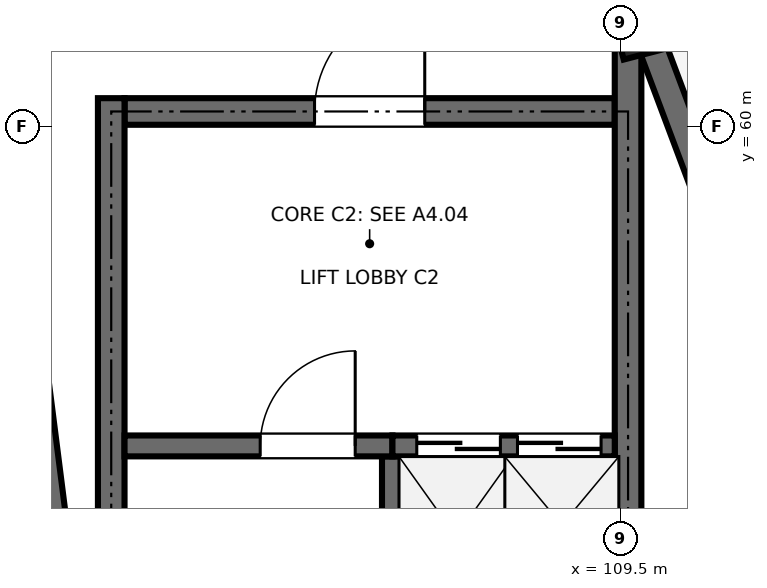
"""IFC4 building model, lengths in metres.
Left out: names, types, materials, properties, quantities, classifications, styles, units other than length and angle.
Written with IfcOpenShell. Run it as: python <this file> out.ifc"""

import sys

from ifc_helpers import new_model, si_unit, direction, frame, frame_2d, origin, origin_2d, place, context, subcontext, project, spatial, rectangle, extrude, element, fill, save


model = new_model("IFC4")
c1 = context("Model", 3, precision=1e-05, world=origin(), true_north=direction((0.0, 1.0)))
c2 = subcontext(c1, "Body", "Model", "MODEL_VIEW")
j1 = project(units=[si_unit("LENGTHUNIT", "METRE"), si_unit("PLANEANGLEUNIT", "RADIAN")], contexts=[c1])
p1 = place(None, origin())
s1 = spatial("IfcSite", under=j1, at=p1, CompositionType="ELEMENT")
p2 = place(p1, origin())
s2 = spatial("IfcBuilding", under=s1, at=p2, CompositionType="ELEMENT")
p3 = place(p2, frame((0.0, 0.0, 14.4)))
s3 = spatial("IfcBuildingStorey", under=s2, at=p3, CompositionType="ELEMENT", Elevation=14.4)
p4 = place(p3, frame((109.811, 61.34, 0.0), z_axis=(0.0, 0.0, 1.0), x_axis=(0.967841021032, 0.251562632376, 0.0)))
e1 = element("IfcColumn", 1, at=p4, inside=s3, PredefinedType="COLUMN", context=c2, shape_type="SweptSolid", body=[
    extrude(rectangle(XDim=0.75, YDim=0.75, at=origin_2d()), origin(), (0.0, 0.0, 1.0), 4.2),
])
p5 = place(p3, frame((111.075, 57.973, 0.0), z_axis=(0.0, 0.0, 1.0), x_axis=(-0.351279653979, 0.936270583058, 0.0)))
e2 = element("IfcWall", 2, at=p5, inside=s3, PredefinedType="SHEAR", context=c2, shape_type="SweptSolid", body=[
    extrude(rectangle(XDim=3.597, YDim=0.36, at=frame_2d((1.798, 0.0))), origin(), (0.0, 0.0, 1.0), 3.96),
])
p6 = place(p3, frame((102.1, 54.5, 0.0), z_axis=(0.0, 0.0, 1.0), x_axis=(-0.126180195213, 0.992007337844, 0.0)))
e3 = element("IfcWall", 3, at=p6, inside=s3, PredefinedType="SHEAR", context=c2, shape_type="SweptSolid", body=[
    extrude(rectangle(XDim=2.24, YDim=0.3, at=frame_2d((1.12, 0.0))), origin(), (0.0, 0.0, 1.0), 3.96),
])
p7 = place(p3, frame((102.975, 60.2, 0.0), z_axis=(0.0, 0.0, 1.0), x_axis=(1.0, 0.0, 0.0)))
e4 = element("IfcWall", 4, at=p7, inside=s3, PredefinedType="SHEAR", context=c2, shape_type="SweptSolid", body=[
    extrude(rectangle(XDim=6.45, YDim=0.35, at=frame_2d((3.225, 0.0))), origin(), (0.0, 0.0, 1.0), 3.96),
])
p8 = place(p7, frame((2.5, 0.0, 0.0)))
e5 = element("IfcOpeningElement", 5, at=p8, cuts=e4, PredefinedType="OPENING", context=c2, shape_type="SweptSolid", body=[
    extrude(rectangle(XDim=1.45, YDim=2.2, at=frame_2d((0.725, 1.1))), frame((0.0, 0.185, 0.0), z_axis=(0.0, -1.0, 0.0), x_axis=(1.0, 0.0, 0.0)), (0.0, 0.0, 1.0), 0.37),
])
p9 = place(p3, frame((102.8, 48.775, 0.0), z_axis=(0.0, 0.0, 1.0), x_axis=(0.0, 1.0, 0.0)))
e6 = element("IfcWall", 6, at=p9, inside=s3, PredefinedType="SHEAR", context=c2, shape_type="SweptSolid", body=[
    extrude(rectangle(XDim=11.6, YDim=0.35, at=frame_2d((5.8, 0.0))), origin(), (0.0, 0.0, 1.0), 3.96),
])
p10 = place(p3, frame((109.6, 48.775, 0.0), z_axis=(0.0, 0.0, 1.0), x_axis=(0.0, 1.0, 0.0)))
e7 = element("IfcWall", 7, at=p10, inside=s3, PredefinedType="SHEAR", context=c2, shape_type="SweptSolid", body=[
    extrude(rectangle(XDim=12.565, YDim=0.35, at=frame_2d((6.283, 0.0))), origin(), (0.0, 0.0, 1.0), 3.96),
])
p11 = place(p3, frame((106.5, 48.775, 0.0), z_axis=(0.0, 0.0, 1.0), x_axis=(0.0, 1.0, 0.0)))
e8 = element("IfcWall", 8, at=p11, inside=s3, PredefinedType="SHEAR", context=c2, shape_type="SweptSolid", body=[
    extrude(rectangle(XDim=6.888, YDim=0.275, at=frame_2d((3.444, 0.0))), origin(), (0.0, 0.0, 1.0), 3.96),
])
p12 = place(p3, frame((102.975, 55.8, 0.0), z_axis=(0.0, 0.0, 1.0), x_axis=(1.0, 0.0, 0.0)))
e9 = element("IfcWall", 9, at=p12, inside=s3, PredefinedType="SHEAR", context=c2, shape_type="SweptSolid", body=[
    extrude(rectangle(XDim=3.525, YDim=0.275, at=frame_2d((1.762, 0.0))), origin(), (0.0, 0.0, 1.0), 3.96),
])
p13 = place(p12, frame((1.785, 0.0, 0.0)))
e10 = element("IfcOpeningElement", 10, at=p13, cuts=e9, PredefinedType="OPENING", context=c2, shape_type="SweptSolid", body=[
    extrude(rectangle(XDim=1.25, YDim=2.15, at=frame_2d((0.625, 1.075))), frame((0.0, 0.147, 0.0), z_axis=(0.0, -1.0, 0.0), x_axis=(1.0, 0.0, 0.0)), (0.0, 0.0, 1.0), 0.295),
])
p14 = place(p3, frame((106.5, 55.8, 0.0), z_axis=(0.0, 0.0, 1.0), x_axis=(1.0, 0.0, 0.0)))
e11 = element("IfcWall", 11, at=p14, inside=s3, PredefinedType="SHEAR", context=c2, shape_type="SweptSolid", body=[
    extrude(rectangle(XDim=2.925, YDim=0.275, at=frame_2d((1.462, 0.0))), origin(), (0.0, 0.0, 1.0), 3.96),
])
p15 = place(p14, frame((0.32, 0.0, 0.0)))
e12 = element("IfcOpeningElement", 12, at=p15, cuts=e11, PredefinedType="OPENING", context=c2, shape_type="SweptSolid", body=[
    extrude(rectangle(XDim=1.1, YDim=2.15, at=frame_2d((0.55, 1.075))), frame((0.0, 0.147, 0.0), z_axis=(0.0, -1.0, 0.0), x_axis=(1.0, 0.0, 0.0)), (0.0, 0.0, 1.0), 0.295),
])
p16 = place(p14, frame((1.645, 0.0, 0.0)))
e13 = element("IfcOpeningElement", 13, at=p16, cuts=e11, PredefinedType="OPENING", context=c2, shape_type="SweptSolid", body=[
    extrude(rectangle(XDim=1.1, YDim=2.15, at=frame_2d((0.55, 1.075))), frame((0.0, 0.147, 0.0), z_axis=(0.0, -1.0, 0.0), x_axis=(1.0, 0.0, 0.0)), (0.0, 0.0, 1.0), 0.295),
])
p17 = place(p3, frame((108.032, 48.775, 0.0), z_axis=(0.0, 0.0, 1.0), x_axis=(0.0, 1.0, 0.0)))
e14 = element("IfcWall", 14, at=p17, inside=s3, PredefinedType="PARTITIONING", context=c2, shape_type="SweptSolid", body=[
    extrude(rectangle(XDim=6.825, YDim=0.15, at=frame_2d((3.413, 0.0))), origin(), (0.0, 0.0, 1.0), 3.954),
])
p18 = place(p13, origin())
e15 = element("IfcDoor", 15, at=p18, inside=s3, OperationType="SINGLE_SWING_RIGHT", PredefinedType="DOOR", context=c2, shape_type="SweptSolid", body=[
    extrude(rectangle(XDim=1.25, YDim=2.15, at=frame_2d((0.625, 1.075))), frame((0.0, 0.025, 0.0), z_axis=(0.0, -1.0, 0.0), x_axis=(1.0, 0.0, 0.0)), (0.0, 0.0, 1.0), 0.05),
])
fill(e10, e15)
p19 = place(p15, origin())
e16 = element("IfcDoor", 16, at=p19, inside=s3, OperationType="DOUBLE_DOOR_SLIDING", PredefinedType="DOOR", context=c2, shape_type="SweptSolid", body=[
    extrude(rectangle(XDim=1.1, YDim=2.15, at=frame_2d((0.55, 1.075))), frame((0.0, 0.025, 0.0), z_axis=(0.0, -1.0, 0.0), x_axis=(1.0, 0.0, 0.0)), (0.0, 0.0, 1.0), 0.05),
])
fill(e12, e16)
p20 = place(p16, origin())
e17 = element("IfcDoor", 17, at=p20, inside=s3, OperationType="DOUBLE_DOOR_SLIDING", PredefinedType="DOOR", context=c2, shape_type="SweptSolid", body=[
    extrude(rectangle(XDim=1.1, YDim=2.15, at=frame_2d((0.55, 1.075))), frame((0.0, 0.025, 0.0), z_axis=(0.0, -1.0, 0.0), x_axis=(1.0, 0.0, 0.0)), (0.0, 0.0, 1.0), 0.05),
])
fill(e13, e17)
p21 = place(p8, origin())
e18 = element("IfcDoor", 18, at=p21, inside=s3, OperationType="SINGLE_SWING_RIGHT", PredefinedType="DOOR", context=c2, shape_type="SweptSolid", body=[
    extrude(rectangle(XDim=1.45, YDim=2.2, at=frame_2d((0.725, 1.1))), frame((0.0, 0.025, 0.0), z_axis=(0.0, -1.0, 0.0), x_axis=(1.0, 0.0, 0.0)), (0.0, 0.0, 1.0), 0.05),
])
fill(e5, e18)
save(model, sys.argv[1])
